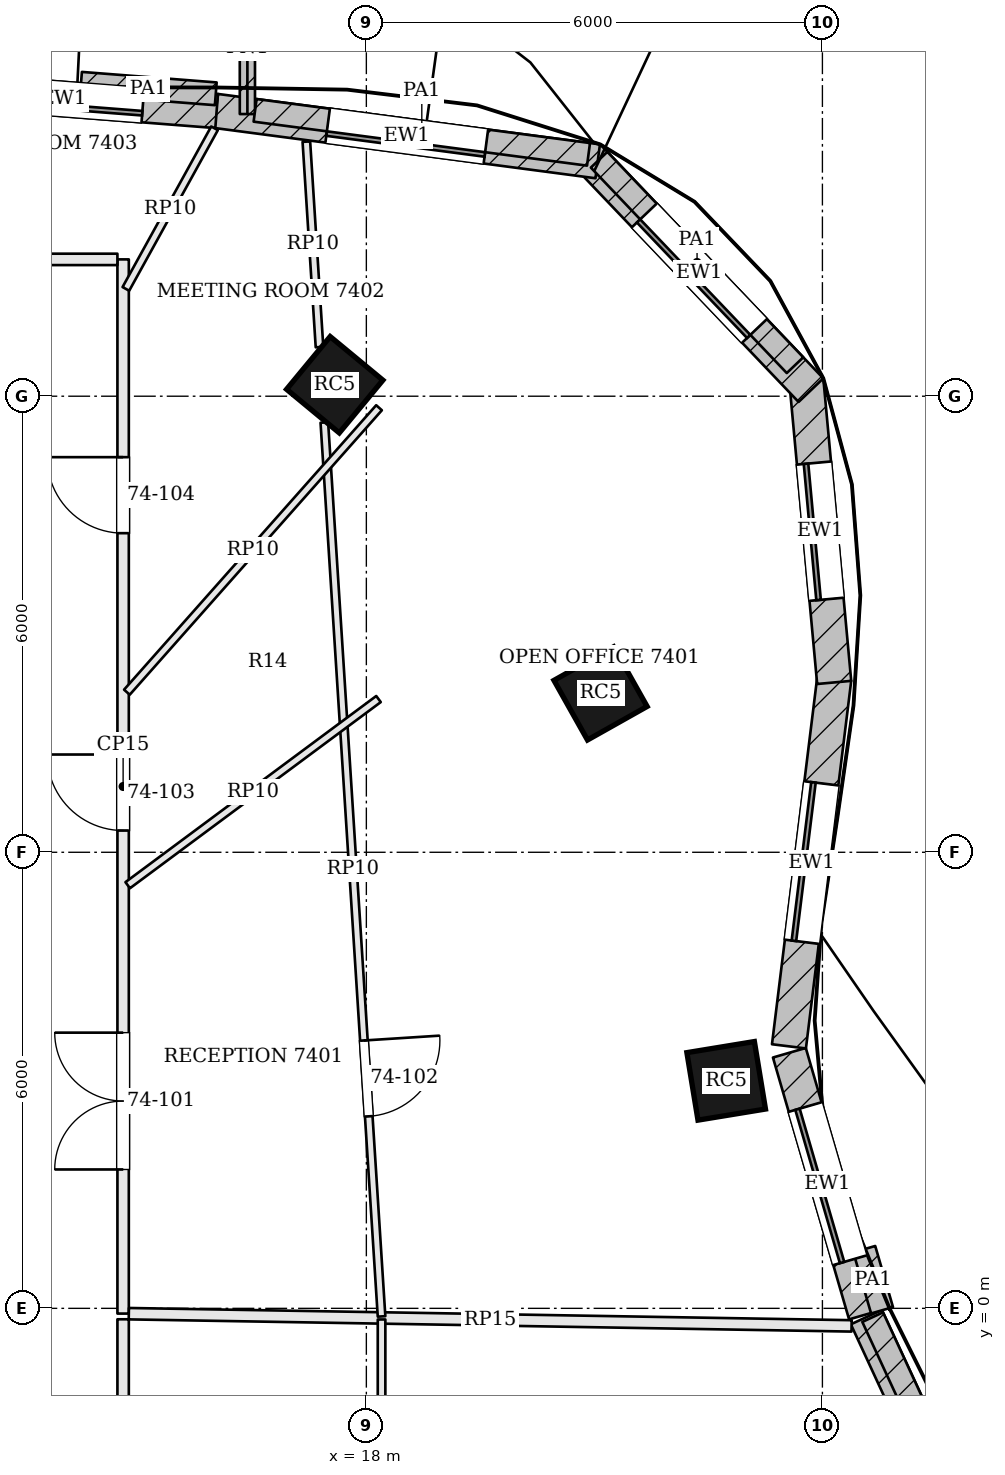
"""IFC4 building model, lengths in metres.
Left out: names, types, materials, properties, quantities, classifications, styles, units other than length and angle.
Written with IfcOpenShell. Run it as: python <this file> out.ifc"""

import sys

from ifc_helpers import new_model, si_unit, direction, frame, frame_2d, origin, origin_2d, place, context, subcontext, project, spatial, rectangle, extrude, element, fill, save


model = new_model("IFC4")
c1 = context("Model", 3, precision=1e-05, world=origin(), true_north=direction((0.0, 1.0)))
c2 = subcontext(c1, "Body", "Model", "MODEL_VIEW")
j1 = project(units=[si_unit("LENGTHUNIT", "METRE"), si_unit("PLANEANGLEUNIT", "RADIAN")], contexts=[c1])
p1 = place(None, origin())
s1 = spatial("IfcSite", under=j1, at=p1, CompositionType="ELEMENT")
p2 = place(p1, origin())
s2 = spatial("IfcBuilding", under=s1, at=p2, CompositionType="ELEMENT")
p3 = place(p2, frame((0.0, 0.0, 300.0)))
s3 = spatial("IfcBuildingStorey", under=s2, at=p3, CompositionType="ELEMENT", Elevation=300.0)
for number, where, z_axis, x_axis in (
    (1, (22.734, 2.993, 0.0), (0.0, 0.0, 1.0), (-0.162, 0.987, 0.0)),
    (2, (21.081, 8.09, 0.0), (0.0, 0.0, 1.0), (-0.49, 0.872, 0.0)),
    (3, (17.584, 12.151, 0.0), (0.0, 0.0, 1.0), (-0.771, 0.637, 0.0)),
):
    element("IfcColumn", number, at=place(p3, frame(where, z_axis=z_axis, x_axis=x_axis)), inside=s3, PredefinedType="COLUMN", context=c2, shape_type="SweptSolid", body=[
        extrude(rectangle(XDim=0.9, YDim=0.9, at=origin_2d()), origin(), (0.0, 0.0, 1.0), 3.9),
    ])
p4 = place(p3, frame((24.567, -0.082, 0.0), z_axis=(0.0, 0.0, 1.0), x_axis=(-0.279202919694, 0.960232122788, 0.0)))
e4 = element("IfcWall", 4, at=p4, inside=s3, PredefinedType="SOLIDWALL", context=c2, shape_type="SweptSolid", body=[
    extrude(rectangle(XDim=3.588, YDim=0.45, at=frame_2d((1.794, 0.0))), origin(), (0.0, 0.0, 1.0), 3.7),
])
p5 = place(p4, frame((0.744, 0.0, 0.9)))
e5 = element("IfcOpeningElement", 5, at=p5, cuts=e4, PredefinedType="OPENING", context=c2, shape_type="SweptSolid", body=[
    extrude(rectangle(XDim=2.1, YDim=2.3, at=frame_2d((1.05, 1.15))), frame((0.0, 0.235, 0.0), z_axis=(0.0, -1.0, 0.0), x_axis=(1.0, 0.0, 0.0)), (0.0, 0.0, 1.0), 0.47),
])
p6 = place(p3, frame((23.56, 3.447, 0.0), z_axis=(0.0, 0.0, 1.0), x_axis=(0.12231391248, 0.992491464353, 0.0)))
e6 = element("IfcWall", 6, at=p6, inside=s3, PredefinedType="SOLIDWALL", context=c2, shape_type="SweptSolid", body=[
    extrude(rectangle(XDim=4.872, YDim=0.45, at=frame_2d((2.436, 0.0))), origin(), (0.0, 0.0, 1.0), 3.7),
])
p7 = place(p6, frame((1.386, 0.0, 0.9)))
e7 = element("IfcOpeningElement", 7, at=p7, cuts=e6, PredefinedType="OPENING", context=c2, shape_type="SweptSolid", body=[
    extrude(rectangle(XDim=2.1, YDim=2.3, at=frame_2d((1.05, 1.15))), frame((0.0, 0.235, 0.0), z_axis=(0.0, -1.0, 0.0), x_axis=(1.0, 0.0, 0.0)), (0.0, 0.0, 1.0), 0.47),
])
p8 = place(p3, frame((24.155, 8.235, 0.0), z_axis=(0.0, 0.0, 1.0), x_axis=(-0.091874058945, 0.995770634882, 0.0)))
e8 = element("IfcWall", 8, at=p8, inside=s3, PredefinedType="SOLIDWALL", context=c2, shape_type="SweptSolid", body=[
    extrude(rectangle(XDim=3.997, YDim=0.45, at=frame_2d((1.998, 0.0))), origin(), (0.0, 0.0, 1.0), 3.7),
])
p9 = place(p8, frame((1.098, 0.0, 0.9)))
e9 = element("IfcOpeningElement", 9, at=p9, cuts=e8, PredefinedType="OPENING", context=c2, shape_type="SweptSolid", body=[
    extrude(rectangle(XDim=1.8, YDim=2.3, at=frame_2d((0.9, 1.15))), frame((0.0, 0.235, 0.0), z_axis=(0.0, -1.0, 0.0), x_axis=(1.0, 0.0, 0.0)), (0.0, 0.0, 1.0), 0.47),
])
p10 = place(p3, frame((23.849, 12.08, 0.0), z_axis=(0.0, 0.0, 1.0), x_axis=(-0.690057851873, 0.723754213161, 0.0)))
e10 = element("IfcWall", 10, at=p10, inside=s3, PredefinedType="SOLIDWALL", context=c2, shape_type="SweptSolid", body=[
    extrude(rectangle(XDim=4.253, YDim=0.45, at=frame_2d((2.126, 0.0))), origin(), (0.0, 0.0, 1.0), 3.7),
])
p11 = place(p10, frame((1.076, 0.0, 0.9)))
e11 = element("IfcOpeningElement", 11, at=p11, cuts=e10, PredefinedType="OPENING", context=c2, shape_type="SweptSolid", body=[
    extrude(rectangle(XDim=2.1, YDim=2.3, at=frame_2d((1.05, 1.15))), frame((0.0, 0.235, 0.0), z_axis=(0.0, -1.0, 0.0), x_axis=(1.0, 0.0, 0.0)), (0.0, 0.0, 1.0), 0.47),
])
p12 = place(p3, frame((21.044, 15.091, 0.0), z_axis=(0.0, 0.0, 1.0), x_axis=(-0.991409967396, 0.130790965086, 0.0)))
e12 = element("IfcWall", 12, at=p12, inside=s3, PredefinedType="SOLIDWALL", context=c2, shape_type="SweptSolid", body=[
    extrude(rectangle(XDim=5.068, YDim=0.45, at=frame_2d((2.534, 0.0))), origin(), (0.0, 0.0, 1.0), 3.7),
])
p13 = place(p12, frame((1.484, 0.0, 0.9)))
e13 = element("IfcOpeningElement", 13, at=p13, cuts=e12, PredefinedType="OPENING", context=c2, shape_type="SweptSolid", body=[
    extrude(rectangle(XDim=2.1, YDim=2.3, at=frame_2d((1.05, 1.15))), frame((0.0, 0.235, 0.0), z_axis=(0.0, -1.0, 0.0), x_axis=(1.0, 0.0, 0.0)), (0.0, 0.0, 1.0), 0.47),
])
p14 = place(p3, frame((16.03, 15.752, 0.0), z_axis=(0.0, 0.0, 1.0), x_axis=(-0.996967628157, 0.077817404267, 0.0)))
e14 = element("IfcWall", 14, at=p14, inside=s3, PredefinedType="SOLIDWALL", context=c2, shape_type="SweptSolid", body=[
    extrude(rectangle(XDim=4.047, YDim=0.45, at=frame_2d((2.023, 0.0))), origin(), (0.0, 0.0, 1.0), 3.7),
])
p15 = place(p14, frame((0.974, 0.0, 0.9)))
e15 = element("IfcOpeningElement", 15, at=p15, cuts=e14, PredefinedType="OPENING", context=c2, shape_type="SweptSolid", body=[
    extrude(rectangle(XDim=2.1, YDim=2.3, at=frame_2d((1.05, 1.15))), frame((0.0, 0.235, 0.0), z_axis=(0.0, -1.0, 0.0), x_axis=(1.0, 0.0, 0.0)), (0.0, 0.0, 1.0), 0.47),
])
p16 = place(p3, frame((26.524, -4.324, 0.0), z_axis=(0.0, 0.0, 1.0), x_axis=(-0.419579037504, 0.907718806287, 0.0)))
e16 = element("IfcWall", 16, at=p16, inside=s3, PredefinedType="SOLIDWALL", context=c2, shape_type="SweptSolid", body=[
    extrude(rectangle(XDim=4.636, YDim=0.45, at=frame_2d((2.318, 0.0))), origin(), (0.0, 0.0, 1.0), 3.7),
])
p17 = place(p16, frame((1.268, 0.0, 0.9)))
e17 = element("IfcOpeningElement", 17, at=p17, cuts=e16, PredefinedType="OPENING", context=c2, shape_type="SweptSolid", body=[
    extrude(rectangle(XDim=2.1, YDim=2.3, at=frame_2d((1.05, 1.15))), frame((0.0, 0.235, 0.0), z_axis=(0.0, -1.0, 0.0), x_axis=(1.0, 0.0, 0.0)), (0.0, 0.0, 1.0), 0.47),
])
p18 = place(p3, frame((16.435, 15.712, 0.0), z_axis=(0.0, 0.0, 1.0), x_axis=(-0.000279017846, 0.999999961075, 0.0)))
e18 = element("IfcWall", 18, at=p18, inside=s3, PredefinedType="SOLIDWALL", context=c2, shape_type="SweptSolid", body=[
    extrude(rectangle(XDim=1.75, YDim=0.2, at=frame_2d((0.875, 0.0))), origin(), (0.0, 0.0, 1.0), 3.7),
])
p19 = place(p3, frame((24.785, -0.026, 3.9), z_axis=(0.0, 0.0, 1.0), x_axis=(-0.279261128564, 0.96021519571, 0.0)))
e19 = element("IfcWall", 19, at=p19, inside=s3, PredefinedType="PARAPET", context=c2, shape_type="SweptSolid", body=[
    extrude(rectangle(XDim=0.837, YDim=0.3, at=frame_2d((0.419, 0.0))), origin(), (0.0, 0.0, 1.0), 1.1),
])
p20 = place(p3, frame((23.64, 12.408, 3.9), z_axis=(0.0, 0.0, 1.0), x_axis=(-0.690141419558, 0.723674526987, 0.0)))
e20 = element("IfcWall", 20, at=p20, inside=s3, PredefinedType="PARAPET", context=c2, shape_type="SweptSolid", body=[
    extrude(rectangle(XDim=3.735, YDim=0.3, at=frame_2d((1.867, 0.0))), origin(), (0.0, 0.0, 1.0), 1.1),
])
p21 = place(p3, frame((20.923, 15.182, 3.9), z_axis=(0.0, 0.0, 1.0), x_axis=(-0.991411041714, 0.130782821377, 0.0)))
e21 = element("IfcWall", 21, at=p21, inside=s3, PredefinedType="PARAPET", context=c2, shape_type="SweptSolid", body=[
    extrude(rectangle(XDim=4.424, YDim=0.3, at=frame_2d((2.212, 0.0))), origin(), (0.0, 0.0, 1.0), 1.1),
])
p22 = place(p3, frame((16.019, 15.979, 3.9), z_axis=(0.0, 0.0, 1.0), x_axis=(-0.99696580474, 0.077840761676, 0.0)))
e22 = element("IfcWall", 22, at=p22, inside=s3, PredefinedType="PARAPET", context=c2, shape_type="SweptSolid", body=[
    extrude(rectangle(XDim=1.778, YDim=0.3, at=frame_2d((0.889, 0.0))), origin(), (0.0, 0.0, 1.0), 1.1),
])
p23 = place(p3, frame((26.548, -4.198, 3.9), z_axis=(0.0, 0.0, 1.0), x_axis=(-0.419598608408, 0.907709759682, 0.0)))
e23 = element("IfcWall", 23, at=p23, inside=s3, PredefinedType="PARAPET", context=c2, shape_type="SweptSolid", body=[
    extrude(rectangle(XDim=4.497, YDim=0.3, at=frame_2d((2.249, 0.0))), origin(), (0.0, 0.0, 1.0), 1.1),
])
p24 = place(p3, frame((14.8, -0.069, 0.0), z_axis=(0.0, 0.0, 1.0), x_axis=(0.0, 1.0, 0.0)))
e24 = element("IfcWall", 24, at=p24, inside=s3, PredefinedType="PARTITIONING", context=c2, shape_type="SweptSolid", body=[
    extrude(rectangle(XDim=13.869, YDim=0.15, at=frame_2d((6.935, 0.0))), origin(), (0.0, 0.0, 1.0), 3.198),
])
p25 = place(p24, frame((1.896, 0.0, 0.0)))
e25 = element("IfcOpeningElement", 25, at=p25, cuts=e24, PredefinedType="OPENING", context=c2, shape_type="SweptSolid", body=[
    extrude(rectangle(XDim=1.8, YDim=2.1, at=frame_2d((0.9, 1.05))), frame((0.0, 0.085, 0.0), z_axis=(0.0, -1.0, 0.0), x_axis=(1.0, 0.0, 0.0)), (0.0, 0.0, 1.0), 0.17),
])
p26 = place(p24, frame((6.355, 0.0, 0.0)))
e26 = element("IfcOpeningElement", 26, at=p26, cuts=e24, PredefinedType="OPENING", context=c2, shape_type="SweptSolid", body=[
    extrude(rectangle(XDim=1.0, YDim=2.4, at=frame_2d((0.5, 1.2))), frame((0.0, 0.085, 0.0), z_axis=(0.0, -1.0, 0.0), x_axis=(1.0, 0.0, 0.0)), (0.0, 0.0, 1.0), 0.17),
])
p27 = place(p24, frame((10.267, 0.0, 0.0)))
e27 = element("IfcOpeningElement", 27, at=p27, cuts=e24, PredefinedType="OPENING", context=c2, shape_type="SweptSolid", body=[
    extrude(rectangle(XDim=1.0, YDim=2.4, at=frame_2d((0.5, 1.2))), frame((0.0, 0.085, 0.0), z_axis=(0.0, -1.0, 0.0), x_axis=(1.0, 0.0, 0.0)), (0.0, 0.0, 1.0), 0.17),
])
p28 = place(p3, frame((14.725, 13.8, 0.0), z_axis=(0.0, 0.0, 1.0), x_axis=(-1.0, 0.0, 0.0)))
e28 = element("IfcWall", 28, at=p28, inside=s3, PredefinedType="PARTITIONING", context=c2, shape_type="SweptSolid", body=[
    extrude(rectangle(XDim=14.616, YDim=0.15, at=frame_2d((7.308, 0.0))), origin(), (0.0, 0.0, 1.0), 3.198),
])
p29 = place(p28, frame((4.719, 0.0, 0.0)))
e29 = element("IfcOpeningElement", 29, at=p29, cuts=e28, PredefinedType="OPENING", context=c2, shape_type="SweptSolid", body=[
    extrude(rectangle(XDim=1.0, YDim=2.4, at=frame_2d((0.5, 1.2))), frame((0.0, 0.085, 0.0), z_axis=(0.0, -1.0, 0.0), x_axis=(1.0, 0.0, 0.0)), (0.0, 0.0, 1.0), 0.17),
])
p30 = place(p28, frame((2.45, 0.0, 0.0)))
e30 = element("IfcOpeningElement", 30, at=p30, cuts=e28, PredefinedType="OPENING", context=c2, shape_type="SweptSolid", body=[
    extrude(rectangle(XDim=0.9, YDim=2.1, at=frame_2d((0.45, 1.05))), frame((0.0, 0.085, 0.0), z_axis=(0.0, -1.0, 0.0), x_axis=(1.0, 0.0, 0.0)), (0.0, 0.0, 1.0), 0.17),
])
p31 = place(p28, frame((8.75, 0.0, 0.0)))
e31 = element("IfcOpeningElement", 31, at=p31, cuts=e28, PredefinedType="OPENING", context=c2, shape_type="SweptSolid", body=[
    extrude(rectangle(XDim=1.0, YDim=2.1, at=frame_2d((0.5, 1.05))), frame((0.0, 0.085, 0.0), z_axis=(0.0, -1.0, 0.0), x_axis=(1.0, 0.0, 0.0)), (0.0, 0.0, 1.0), 0.17),
])
p32 = place(p28, frame((12.65, 0.0, 0.0)))
e32 = element("IfcOpeningElement", 32, at=p32, cuts=e28, PredefinedType="OPENING", context=c2, shape_type="SweptSolid", body=[
    extrude(rectangle(XDim=0.9, YDim=2.1, at=frame_2d((0.45, 1.05))), frame((0.0, 0.085, 0.0), z_axis=(0.0, -1.0, 0.0), x_axis=(1.0, 0.0, 0.0)), (0.0, 0.0, 1.0), 0.17),
])
p33 = place(p3, frame((24.384, -0.231, 0.0), z_axis=(0.0, 0.0, 1.0), x_axis=(-0.999857754758, 0.016866245889, 0.0)))
e33 = element("IfcWall", 33, at=p33, inside=s3, PredefinedType="PARTITIONING", context=c2, shape_type="SweptSolid", body=[
    extrude(rectangle(XDim=9.51, YDim=0.15, at=frame_2d((4.755, 0.0))), origin(), (0.0, 0.0, 1.0), 3.234),
])
p34 = place(p3, frame((14.8, -4.725, 0.0), z_axis=(0.0, 0.0, 1.0), x_axis=(0.0, 1.0, 0.0)))
e34 = element("IfcWall", 34, at=p34, inside=s3, PredefinedType="PARTITIONING", context=c2, shape_type="SweptSolid", body=[
    extrude(rectangle(XDim=4.581, YDim=0.15, at=frame_2d((2.291, 0.0))), origin(), (0.0, 0.0, 1.0), 3.198),
])
p35 = place(p3, frame((17.211, 15.349, 0.0), z_axis=(0.0, 0.0, 1.0), x_axis=(0.06391026604, -0.997955649262, 0.0)))
e35 = element("IfcWall", 35, at=p35, inside=s3, PredefinedType="PARTITIONING", context=c2, shape_type="SweptSolid", body=[
    extrude(rectangle(XDim=2.708, YDim=0.1, at=frame_2d((1.354, 0.0))), origin(), (0.0, 0.0, 1.0), 3.184),
])
p36 = place(p3, frame((17.447, 11.654, 0.0), z_axis=(0.0, 0.0, 1.0), x_axis=(0.063870484703, -0.99795819611, 0.0)))
e36 = element("IfcWall", 36, at=p36, inside=s3, PredefinedType="PARTITIONING", context=c2, shape_type="SweptSolid", body=[
    extrude(rectangle(XDim=11.785, YDim=0.1, at=frame_2d((5.892, 0.0))), origin(), (0.0, 0.0, 1.0), 3.184),
])
p37 = place(p36, frame((8.147, 0.0, 0.0)))
e37 = element("IfcOpeningElement", 37, at=p37, cuts=e36, PredefinedType="OPENING", context=c2, shape_type="SweptSolid", body=[
    extrude(rectangle(XDim=1.0, YDim=2.1, at=frame_2d((0.5, 1.05))), frame((0.0, 0.06, 0.0), z_axis=(0.0, -1.0, 0.0), x_axis=(1.0, 0.0, 0.0)), (0.0, 0.0, 1.0), 0.12),
])
p38 = place(p3, frame((14.86, 5.567, 0.0), z_axis=(0.0, 0.0, 1.0), x_axis=(0.803012729879, 0.595961874328, 0.0)))
e38 = element("IfcWall", 38, at=p38, inside=s3, PredefinedType="PARTITIONING", context=c2, shape_type="SweptSolid", body=[
    extrude(rectangle(XDim=4.109, YDim=0.1, at=frame_2d((2.055, 0.0))), origin(), (0.0, 0.0, 1.0), 3.184),
])
p39 = place(p3, frame((14.85, 8.106, 0.0), z_axis=(0.0, 0.0, 1.0), x_axis=(0.663305650233, 0.748348591479, 0.0)))
e39 = element("IfcWall", 39, at=p39, inside=s3, PredefinedType="PARTITIONING", context=c2, shape_type="SweptSolid", body=[
    extrude(rectangle(XDim=5.001, YDim=0.1, at=frame_2d((2.5, 0.0))), origin(), (0.0, 0.0, 1.0), 3.184),
])
p40 = place(p3, frame((14.836, 13.412, 0.0), z_axis=(0.0, 0.0, 1.0), x_axis=(0.483304666726, 0.875452225493, 0.0)))
e40 = element("IfcWall", 40, at=p40, inside=s3, PredefinedType="PARTITIONING", context=c2, shape_type="SweptSolid", body=[
    extrude(rectangle(XDim=2.413, YDim=0.1, at=frame_2d((1.207, 0.0))), origin(), (0.0, 0.0, 1.0), 3.184),
])
p41 = place(p3, frame((18.2, -0.146, 0.0), z_axis=(0.0, 0.0, 1.0), x_axis=(0.0, -1.0, 0.0)))
e41 = element("IfcWall", 41, at=p41, inside=s3, PredefinedType="PARTITIONING", context=c2, shape_type="SweptSolid", body=[
    extrude(rectangle(XDim=8.054, YDim=0.1, at=frame_2d((4.027, 0.0))), origin(), (0.0, 0.0, 1.0), 3.184),
])
p42 = place(p41, frame((1.744, 0.0, 0.0)))
e42 = element("IfcOpeningElement", 42, at=p42, cuts=e41, PredefinedType="OPENING", context=c2, shape_type="SweptSolid", body=[
    extrude(rectangle(XDim=0.9, YDim=2.1, at=frame_2d((0.45, 1.05))), frame((0.0, 0.06, 0.0), z_axis=(0.0, -1.0, 0.0), x_axis=(1.0, 0.0, 0.0)), (0.0, 0.0, 1.0), 0.12),
])
p43 = place(p5, origin())
e43 = element("IfcWindow", 43, at=p43, inside=s3, PartitioningType="SINGLE_PANEL", PredefinedType="WINDOW", context=c2, shape_type="SweptSolid", body=[
    extrude(rectangle(XDim=2.1, YDim=2.3, at=frame_2d((1.05, 1.15))), frame((0.0, 0.135, 0.0), z_axis=(0.0, -1.0, 0.0), x_axis=(1.0, 0.0, 0.0)), (0.0, 0.0, 1.0), 0.06),
])
fill(e5, e43)
p44 = place(p7, origin())
e44 = element("IfcWindow", 44, at=p44, inside=s3, PartitioningType="SINGLE_PANEL", PredefinedType="WINDOW", context=c2, shape_type="SweptSolid", body=[
    extrude(rectangle(XDim=2.1, YDim=2.3, at=frame_2d((1.05, 1.15))), frame((0.0, 0.135, 0.0), z_axis=(0.0, -1.0, 0.0), x_axis=(1.0, 0.0, 0.0)), (0.0, 0.0, 1.0), 0.06),
])
fill(e7, e44)
p45 = place(p9, origin())
e45 = element("IfcWindow", 45, at=p45, inside=s3, PartitioningType="SINGLE_PANEL", PredefinedType="WINDOW", context=c2, shape_type="SweptSolid", body=[
    extrude(rectangle(XDim=1.8, YDim=2.3, at=frame_2d((0.9, 1.15))), frame((0.0, 0.135, 0.0), z_axis=(0.0, -1.0, 0.0), x_axis=(1.0, 0.0, 0.0)), (0.0, 0.0, 1.0), 0.06),
])
fill(e9, e45)
p46 = place(p11, origin())
e46 = element("IfcWindow", 46, at=p46, inside=s3, PartitioningType="SINGLE_PANEL", PredefinedType="WINDOW", context=c2, shape_type="SweptSolid", body=[
    extrude(rectangle(XDim=2.1, YDim=2.3, at=frame_2d((1.05, 1.15))), frame((0.0, 0.135, 0.0), z_axis=(0.0, -1.0, 0.0), x_axis=(1.0, 0.0, 0.0)), (0.0, 0.0, 1.0), 0.06),
])
fill(e11, e46)
p47 = place(p13, origin())
e47 = element("IfcWindow", 47, at=p47, inside=s3, PartitioningType="SINGLE_PANEL", PredefinedType="WINDOW", context=c2, shape_type="SweptSolid", body=[
    extrude(rectangle(XDim=2.1, YDim=2.3, at=frame_2d((1.05, 1.15))), frame((0.0, 0.135, 0.0), z_axis=(0.0, -1.0, 0.0), x_axis=(1.0, 0.0, 0.0)), (0.0, 0.0, 1.0), 0.06),
])
fill(e13, e47)
p48 = place(p15, origin())
e48 = element("IfcWindow", 48, at=p48, inside=s3, PartitioningType="SINGLE_PANEL", PredefinedType="WINDOW", context=c2, shape_type="SweptSolid", body=[
    extrude(rectangle(XDim=2.1, YDim=2.3, at=frame_2d((1.05, 1.15))), frame((0.0, 0.135, 0.0), z_axis=(0.0, -1.0, 0.0), x_axis=(1.0, 0.0, 0.0)), (0.0, 0.0, 1.0), 0.06),
])
fill(e15, e48)
p49 = place(p25, origin())
e49 = element("IfcDoor", 49, at=p49, inside=s3, OperationType="DOUBLE_DOOR_SINGLE_SWING", PredefinedType="DOOR", context=c2, shape_type="SweptSolid", body=[
    extrude(rectangle(XDim=1.8, YDim=2.1, at=frame_2d((0.9, 1.05))), frame((0.0, 0.025, 0.0), z_axis=(0.0, -1.0, 0.0), x_axis=(1.0, 0.0, 0.0)), (0.0, 0.0, 1.0), 0.05),
])
fill(e25, e49)
p50 = place(p37, origin())
e50 = element("IfcDoor", 50, at=p50, inside=s3, OperationType="SINGLE_SWING_LEFT", PredefinedType="DOOR", context=c2, shape_type="SweptSolid", body=[
    extrude(rectangle(XDim=1.0, YDim=2.1, at=frame_2d((0.5, 1.05))), frame((0.0, 0.025, 0.0), z_axis=(0.0, -1.0, 0.0), x_axis=(1.0, 0.0, 0.0)), (0.0, 0.0, 1.0), 0.05),
])
fill(e37, e50)
p51 = place(p26, origin())
e51 = element("IfcDoor", 51, at=p51, inside=s3, OperationType="SINGLE_SWING_RIGHT", PredefinedType="DOOR", context=c2, shape_type="SweptSolid", body=[
    extrude(rectangle(XDim=1.0, YDim=2.4, at=frame_2d((0.5, 1.2))), frame((0.0, 0.025, 0.0), z_axis=(0.0, -1.0, 0.0), x_axis=(1.0, 0.0, 0.0)), (0.0, 0.0, 1.0), 0.05),
])
fill(e26, e51)
p52 = place(p27, origin())
e52 = element("IfcDoor", 52, at=p52, inside=s3, OperationType="SINGLE_SWING_RIGHT", PredefinedType="DOOR", context=c2, shape_type="SweptSolid", body=[
    extrude(rectangle(XDim=1.0, YDim=2.4, at=frame_2d((0.5, 1.2))), frame((0.0, 0.025, 0.0), z_axis=(0.0, -1.0, 0.0), x_axis=(1.0, 0.0, 0.0)), (0.0, 0.0, 1.0), 0.05),
])
fill(e27, e52)
save(model, sys.argv[1])
